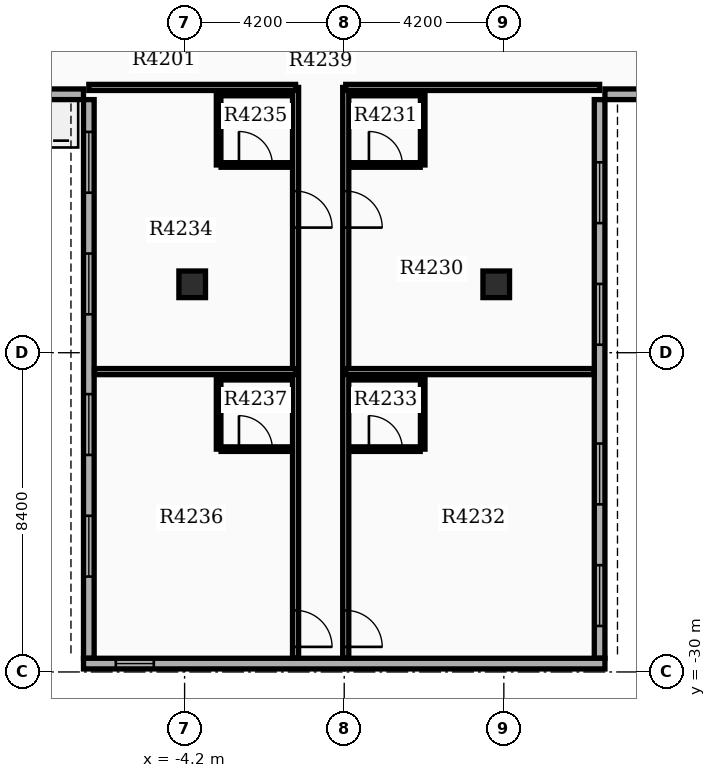
"""IFC4 building model, lengths in metres.
Left out: names, types, materials, properties, quantities, classifications, styles, units other than length and angle.
Written with IfcOpenShell. Run it as: python <this file> out.ifc"""

import sys

from ifc_helpers import new_model, si_unit, direction, frame, frame_2d, origin, origin_2d, place, context, subcontext, project, spatial, rectangle, extrude, element, fill, save


model = new_model("IFC4")
c1 = context("Model", 3, precision=1e-05, world=origin(), true_north=direction((0.0, 1.0)))
c2 = subcontext(c1, "Body", "Model", "MODEL_VIEW")
j1 = project(units=[si_unit("LENGTHUNIT", "METRE"), si_unit("PLANEANGLEUNIT", "RADIAN")], contexts=[c1])
p1 = place(None, origin())
s1 = spatial("IfcSite", under=j1, at=p1, CompositionType="ELEMENT")
p2 = place(p1, origin())
s2 = spatial("IfcBuilding", under=s1, at=p2, CompositionType="ELEMENT")
p3 = place(p2, frame((0.0, 0.0, 265.5)))
s3 = spatial("IfcBuildingStorey", under=s2, at=p3, CompositionType="ELEMENT", Elevation=265.5)
for number, where, z_axis, x_axis in (
    (1, (-4.0, -19.8, 0.0), (0.0, 0.0, 1.0), (1.0, 0.0, 0.0)),
    (2, (4.0, -19.8, 0.0), (0.0, 0.0, 1.0), (1.0, 0.0, 0.0)),
):
    element("IfcColumn", number, at=place(p3, frame(where, z_axis=z_axis, x_axis=x_axis)), inside=s3, PredefinedType="COLUMN", context=c2, shape_type="SweptSolid", body=[
        extrude(rectangle(XDim=0.7, YDim=0.7, at=origin_2d()), origin(), (0.0, 0.0, 1.0), 3.9),
    ])
p4 = place(p3, frame((-6.72, -14.94, 0.0), z_axis=(0.0, 0.0, 1.0), x_axis=(0.0, -1.0, 0.0)))
e3 = element("IfcWall", 3, at=p4, inside=s3, PredefinedType="STANDARD", context=c2, shape_type="SweptSolid", body=[
    extrude(rectangle(XDim=14.7, YDim=0.28, at=frame_2d((7.35, 0.0))), origin(), (0.0, 0.0, 1.0), 3.18),
])
p5 = place(p4, frame((0.85, 0.0, 0.8)))
e4 = element("IfcOpeningElement", 4, at=p5, cuts=e3, PredefinedType="OPENING", context=c2, shape_type="SweptSolid", body=[
    extrude(rectangle(XDim=1.6, YDim=1.7, at=frame_2d((0.8, 0.85))), frame((0.0, 0.15, 0.0), z_axis=(0.0, -1.0, 0.0), x_axis=(1.0, 0.0, 0.0)), (0.0, 0.0, 1.0), 0.3),
])
p6 = place(p4, frame((4.05, 0.0, 0.8)))
e5 = element("IfcOpeningElement", 5, at=p6, cuts=e3, PredefinedType="OPENING", context=c2, shape_type="SweptSolid", body=[
    extrude(rectangle(XDim=1.6, YDim=1.7, at=frame_2d((0.8, 0.85))), frame((0.0, 0.15, 0.0), z_axis=(0.0, -1.0, 0.0), x_axis=(1.0, 0.0, 0.0)), (0.0, 0.0, 1.0), 0.3),
])
p7 = place(p4, frame((7.75, 0.0, 0.8)))
e6 = element("IfcOpeningElement", 6, at=p7, cuts=e3, PredefinedType="OPENING", context=c2, shape_type="SweptSolid", body=[
    extrude(rectangle(XDim=1.6, YDim=1.7, at=frame_2d((0.8, 0.85))), frame((0.0, 0.15, 0.0), z_axis=(0.0, -1.0, 0.0), x_axis=(1.0, 0.0, 0.0)), (0.0, 0.0, 1.0), 0.3),
])
p8 = place(p4, frame((10.95, 0.0, 0.8)))
e7 = element("IfcOpeningElement", 7, at=p8, cuts=e3, PredefinedType="OPENING", context=c2, shape_type="SweptSolid", body=[
    extrude(rectangle(XDim=1.6, YDim=1.7, at=frame_2d((0.8, 0.85))), frame((0.0, 0.15, 0.0), z_axis=(0.0, -1.0, 0.0), x_axis=(1.0, 0.0, 0.0)), (0.0, 0.0, 1.0), 0.3),
])
p9 = place(p3, frame((6.72, -29.64, 0.0), z_axis=(0.0, 0.0, 1.0), x_axis=(0.0, 1.0, 0.0)))
e8 = element("IfcWall", 8, at=p9, inside=s3, PredefinedType="STANDARD", context=c2, shape_type="SweptSolid", body=[
    extrude(rectangle(XDim=14.7, YDim=0.28, at=frame_2d((7.35, 0.0))), origin(), (0.0, 0.0, 1.0), 3.18),
])
p10 = place(p9, frame((0.85, 0.0, 0.8)))
e9 = element("IfcOpeningElement", 9, at=p10, cuts=e8, PredefinedType="OPENING", context=c2, shape_type="SweptSolid", body=[
    extrude(rectangle(XDim=1.6, YDim=1.7, at=frame_2d((0.8, 0.85))), frame((0.0, 0.15, 0.0), z_axis=(0.0, -1.0, 0.0), x_axis=(1.0, 0.0, 0.0)), (0.0, 0.0, 1.0), 0.3),
])
p11 = place(p9, frame((4.05, 0.0, 0.8)))
e10 = element("IfcOpeningElement", 10, at=p11, cuts=e8, PredefinedType="OPENING", context=c2, shape_type="SweptSolid", body=[
    extrude(rectangle(XDim=1.6, YDim=1.7, at=frame_2d((0.8, 0.85))), frame((0.0, 0.15, 0.0), z_axis=(0.0, -1.0, 0.0), x_axis=(1.0, 0.0, 0.0)), (0.0, 0.0, 1.0), 0.3),
])
p12 = place(p9, frame((8.25, 0.0, 0.8)))
e11 = element("IfcOpeningElement", 11, at=p12, cuts=e8, PredefinedType="OPENING", context=c2, shape_type="SweptSolid", body=[
    extrude(rectangle(XDim=1.6, YDim=1.7, at=frame_2d((0.8, 0.85))), frame((0.0, 0.15, 0.0), z_axis=(0.0, -1.0, 0.0), x_axis=(1.0, 0.0, 0.0)), (0.0, 0.0, 1.0), 0.3),
])
p13 = place(p9, frame((11.45, 0.0, 0.8)))
e12 = element("IfcOpeningElement", 12, at=p13, cuts=e8, PredefinedType="OPENING", context=c2, shape_type="SweptSolid", body=[
    extrude(rectangle(XDim=1.6, YDim=1.7, at=frame_2d((0.8, 0.85))), frame((0.0, 0.15, 0.0), z_axis=(0.0, -1.0, 0.0), x_axis=(1.0, 0.0, 0.0)), (0.0, 0.0, 1.0), 0.3),
])
p14 = place(p3, frame((-6.86, -29.78, 0.0), z_axis=(0.0, 0.0, 1.0), x_axis=(1.0, 0.0, 0.0)))
e13 = element("IfcWall", 13, at=p14, inside=s3, PredefinedType="STANDARD", context=c2, shape_type="SweptSolid", body=[
    extrude(rectangle(XDim=13.72, YDim=0.28, at=frame_2d((6.86, 0.0))), origin(), (0.0, 0.0, 1.0), 3.18),
])
p15 = place(p14, frame((0.85, 0.0, 0.85)))
e14 = element("IfcOpeningElement", 14, at=p15, cuts=e13, PredefinedType="OPENING", context=c2, shape_type="SweptSolid", body=[
    extrude(rectangle(XDim=1.0, YDim=1.5, at=frame_2d((0.5, 0.75))), frame((0.0, 0.15, 0.0), z_axis=(0.0, -1.0, 0.0), x_axis=(1.0, 0.0, 0.0)), (0.0, 0.0, 1.0), 0.3),
])
for number, where, z_axis, x_axis in (
    (15, (-13.16, -14.8, 0.0), (0.0, 0.0, 1.0), (1.0, 0.0, 0.0)),
    (16, (13.16, -14.8, 0.0), (0.0, 0.0, 1.0), (-1.0, 0.0, 0.0)),
):
    element("IfcWall", number, at=place(p3, frame(where, z_axis=z_axis, x_axis=x_axis)), inside=s3, PredefinedType="STANDARD", context=c2, shape_type="SweptSolid", body=[
        extrude(rectangle(XDim=6.3, YDim=0.28, at=frame_2d((3.15, 0.0))), origin(), (0.0, 0.0, 1.0), 3.18),
    ])
p16 = place(p3, frame((0.04, -14.62, 0.0), z_axis=(0.0, 0.0, 1.0), x_axis=(0.0, -1.0, 0.0)))
e17 = element("IfcWall", 17, at=p16, inside=s3, PredefinedType="PARTITIONING", context=c2, shape_type="SweptSolid", body=[
    extrude(rectangle(XDim=15.012, YDim=0.16, at=frame_2d((7.506, 0.0))), origin(), (0.0, 0.0, 1.0), 3.17),
])
p17 = place(p16, frame((2.728, 0.0, 0.0)))
e18 = element("IfcOpeningElement", 18, at=p17, cuts=e17, PredefinedType="OPENING", context=c2, shape_type="SweptSolid", body=[
    extrude(rectangle(XDim=0.96, YDim=2.15, at=frame_2d((0.48, 1.075))), frame((0.0, 0.09, 0.0), z_axis=(0.0, -1.0, 0.0), x_axis=(1.0, 0.0, 0.0)), (0.0, 0.0, 1.0), 0.18),
])
p18 = place(p16, frame((13.76, 0.0, 0.0)))
e19 = element("IfcOpeningElement", 19, at=p18, cuts=e17, PredefinedType="OPENING", context=c2, shape_type="SweptSolid", body=[
    extrude(rectangle(XDim=0.96, YDim=2.15, at=frame_2d((0.48, 1.075))), frame((0.0, 0.09, 0.0), z_axis=(0.0, -1.0, 0.0), x_axis=(1.0, 0.0, 0.0)), (0.0, 0.0, 1.0), 0.18),
])
p19 = place(p3, frame((0.04, -14.62, 0.0), z_axis=(0.0, 0.0, 1.0), x_axis=(1.0, 0.0, 0.0)))
e20 = element("IfcWall", 20, at=p19, inside=s3, PredefinedType="PARTITIONING", context=c2, shape_type="SweptSolid", body=[
    extrude(rectangle(XDim=6.68, YDim=0.16, at=frame_2d((3.34, 0.0))), origin(), (0.0, 0.0, 1.0), 3.17),
])
p20 = place(p3, frame((0.04, -22.097, 0.0), z_axis=(0.0, 0.0, 1.0), x_axis=(1.0, 0.0, 0.0)))
e21 = element("IfcWall", 21, at=p20, inside=s3, PredefinedType="PARTITIONING", context=c2, shape_type="SweptSolid", body=[
    extrude(rectangle(XDim=6.532, YDim=0.16, at=frame_2d((3.266, 0.0))), origin(), (0.0, 0.0, 1.0), 3.17),
])
p21 = place(p3, frame((0.18, -16.66, 0.0), z_axis=(0.0, 0.0, 1.0), x_axis=(1.0, 0.0, 0.0)))
e22 = element("IfcWall", 22, at=p21, inside=s3, PredefinedType="PARTITIONING", context=c2, shape_type="SweptSolid", body=[
    extrude(rectangle(XDim=1.82, YDim=0.12, at=frame_2d((0.91, 0.0))), origin(), (0.0, 0.0, 1.0), 3.17),
])
p22 = place(p21, frame((0.47, 0.0, 0.0)))
e23 = element("IfcOpeningElement", 23, at=p22, cuts=e22, PredefinedType="OPENING", context=c2, shape_type="SweptSolid", body=[
    extrude(rectangle(XDim=0.88, YDim=2.1, at=frame_2d((0.44, 1.05))), frame((0.0, 0.07, 0.0), z_axis=(0.0, -1.0, 0.0), x_axis=(1.0, 0.0, 0.0)), (0.0, 0.0, 1.0), 0.14),
])
p23 = place(p3, frame((0.18, -14.78, 0.0), z_axis=(0.0, 0.0, 1.0), x_axis=(1.0, 0.0, 0.0)))
e24 = element("IfcWall", 24, at=p23, inside=s3, PredefinedType="PARTITIONING", context=c2, shape_type="SweptSolid", body=[
    extrude(rectangle(XDim=1.82, YDim=0.12, at=frame_2d((0.91, 0.0))), origin(), (0.0, 0.0, 1.0), 3.17),
])
p24 = place(p3, frame((2.065, -14.78, 0.0), z_axis=(0.0, 0.0, 1.0), x_axis=(0.0, -1.0, 0.0)))
e25 = element("IfcWall", 25, at=p24, inside=s3, PredefinedType="PARTITIONING", context=c2, shape_type="SweptSolid", body=[
    extrude(rectangle(XDim=1.88, YDim=0.12, at=frame_2d((0.94, 0.0))), origin(), (0.0, 0.0, 1.0), 3.17),
])
p25 = place(p3, frame((0.18, -24.137, 0.0), z_axis=(0.0, 0.0, 1.0), x_axis=(1.0, 0.0, 0.0)))
e26 = element("IfcWall", 26, at=p25, inside=s3, PredefinedType="PARTITIONING", context=c2, shape_type="SweptSolid", body=[
    extrude(rectangle(XDim=1.82, YDim=0.12, at=frame_2d((0.91, 0.0))), origin(), (0.0, 0.0, 1.0), 3.17),
])
p26 = place(p25, frame((0.47, 0.0, 0.0)))
e27 = element("IfcOpeningElement", 27, at=p26, cuts=e26, PredefinedType="OPENING", context=c2, shape_type="SweptSolid", body=[
    extrude(rectangle(XDim=0.88, YDim=2.1, at=frame_2d((0.44, 1.05))), frame((0.0, 0.07, 0.0), z_axis=(0.0, -1.0, 0.0), x_axis=(1.0, 0.0, 0.0)), (0.0, 0.0, 1.0), 0.14),
])
p27 = place(p3, frame((0.18, -22.257, 0.0), z_axis=(0.0, 0.0, 1.0), x_axis=(1.0, 0.0, 0.0)))
e28 = element("IfcWall", 28, at=p27, inside=s3, PredefinedType="PARTITIONING", context=c2, shape_type="SweptSolid", body=[
    extrude(rectangle(XDim=1.82, YDim=0.12, at=frame_2d((0.91, 0.0))), origin(), (0.0, 0.0, 1.0), 3.17),
])
p28 = place(p3, frame((2.065, -22.257, 0.0), z_axis=(0.0, 0.0, 1.0), x_axis=(0.0, -1.0, 0.0)))
e29 = element("IfcWall", 29, at=p28, inside=s3, PredefinedType="PARTITIONING", context=c2, shape_type="SweptSolid", body=[
    extrude(rectangle(XDim=1.88, YDim=0.12, at=frame_2d((0.94, 0.0))), origin(), (0.0, 0.0, 1.0), 3.17),
])
p29 = place(p3, frame((-1.28, -14.62, 0.0), z_axis=(0.0, 0.0, 1.0), x_axis=(0.0, -1.0, 0.0)))
e30 = element("IfcWall", 30, at=p29, inside=s3, PredefinedType="PARTITIONING", context=c2, shape_type="SweptSolid", body=[
    extrude(rectangle(XDim=15.012, YDim=0.16, at=frame_2d((7.506, 0.0))), origin(), (0.0, 0.0, 1.0), 3.17),
])
p30 = place(p29, frame((2.728, 0.0, 0.0)))
e31 = element("IfcOpeningElement", 31, at=p30, cuts=e30, PredefinedType="OPENING", context=c2, shape_type="SweptSolid", body=[
    extrude(rectangle(XDim=0.96, YDim=2.15, at=frame_2d((0.48, 1.075))), frame((0.0, 0.09, 0.0), z_axis=(0.0, -1.0, 0.0), x_axis=(1.0, 0.0, 0.0)), (0.0, 0.0, 1.0), 0.18),
])
p31 = place(p29, frame((13.76, 0.0, 0.0)))
e32 = element("IfcOpeningElement", 32, at=p31, cuts=e30, PredefinedType="OPENING", context=c2, shape_type="SweptSolid", body=[
    extrude(rectangle(XDim=0.96, YDim=2.15, at=frame_2d((0.48, 1.075))), frame((0.0, 0.09, 0.0), z_axis=(0.0, -1.0, 0.0), x_axis=(1.0, 0.0, 0.0)), (0.0, 0.0, 1.0), 0.18),
])
p32 = place(p3, frame((-1.28, -14.62, 0.0), z_axis=(0.0, 0.0, 1.0), x_axis=(-1.0, 0.0, 0.0)))
e33 = element("IfcWall", 33, at=p32, inside=s3, PredefinedType="PARTITIONING", context=c2, shape_type="SweptSolid", body=[
    extrude(rectangle(XDim=5.44, YDim=0.16, at=frame_2d((2.72, 0.0))), origin(), (0.0, 0.0, 1.0), 3.17),
])
p33 = place(p3, frame((-1.28, -22.097, 0.0), z_axis=(0.0, 0.0, 1.0), x_axis=(-1.0, 0.0, 0.0)))
e34 = element("IfcWall", 34, at=p33, inside=s3, PredefinedType="PARTITIONING", context=c2, shape_type="SweptSolid", body=[
    extrude(rectangle(XDim=5.292, YDim=0.16, at=frame_2d((2.646, 0.0))), origin(), (0.0, 0.0, 1.0), 3.17),
])
p34 = place(p3, frame((-3.24, -16.66, 0.0), z_axis=(0.0, 0.0, 1.0), x_axis=(1.0, 0.0, 0.0)))
e35 = element("IfcWall", 35, at=p34, inside=s3, PredefinedType="PARTITIONING", context=c2, shape_type="SweptSolid", body=[
    extrude(rectangle(XDim=1.82, YDim=0.12, at=frame_2d((0.91, 0.0))), origin(), (0.0, 0.0, 1.0), 3.17),
])
p35 = place(p34, frame((0.47, 0.0, 0.0)))
e36 = element("IfcOpeningElement", 36, at=p35, cuts=e35, PredefinedType="OPENING", context=c2, shape_type="SweptSolid", body=[
    extrude(rectangle(XDim=0.88, YDim=2.1, at=frame_2d((0.44, 1.05))), frame((0.0, 0.07, 0.0), z_axis=(0.0, -1.0, 0.0), x_axis=(1.0, 0.0, 0.0)), (0.0, 0.0, 1.0), 0.14),
])
p36 = place(p3, frame((-3.24, -14.78, 0.0), z_axis=(0.0, 0.0, 1.0), x_axis=(1.0, 0.0, 0.0)))
e37 = element("IfcWall", 37, at=p36, inside=s3, PredefinedType="PARTITIONING", context=c2, shape_type="SweptSolid", body=[
    extrude(rectangle(XDim=1.82, YDim=0.12, at=frame_2d((0.91, 0.0))), origin(), (0.0, 0.0, 1.0), 3.17),
])
p37 = place(p3, frame((-3.305, -14.78, 0.0), z_axis=(0.0, 0.0, 1.0), x_axis=(0.0, -1.0, 0.0)))
e38 = element("IfcWall", 38, at=p37, inside=s3, PredefinedType="PARTITIONING", context=c2, shape_type="SweptSolid", body=[
    extrude(rectangle(XDim=1.88, YDim=0.12, at=frame_2d((0.94, 0.0))), origin(), (0.0, 0.0, 1.0), 3.17),
])
p38 = place(p3, frame((-3.24, -24.137, 0.0), z_axis=(0.0, 0.0, 1.0), x_axis=(1.0, 0.0, 0.0)))
e39 = element("IfcWall", 39, at=p38, inside=s3, PredefinedType="PARTITIONING", context=c2, shape_type="SweptSolid", body=[
    extrude(rectangle(XDim=1.82, YDim=0.12, at=frame_2d((0.91, 0.0))), origin(), (0.0, 0.0, 1.0), 3.17),
])
p39 = place(p38, frame((0.47, 0.0, 0.0)))
e40 = element("IfcOpeningElement", 40, at=p39, cuts=e39, PredefinedType="OPENING", context=c2, shape_type="SweptSolid", body=[
    extrude(rectangle(XDim=0.88, YDim=2.1, at=frame_2d((0.44, 1.05))), frame((0.0, 0.07, 0.0), z_axis=(0.0, -1.0, 0.0), x_axis=(1.0, 0.0, 0.0)), (0.0, 0.0, 1.0), 0.14),
])
p40 = place(p3, frame((-3.24, -22.257, 0.0), z_axis=(0.0, 0.0, 1.0), x_axis=(1.0, 0.0, 0.0)))
e41 = element("IfcWall", 41, at=p40, inside=s3, PredefinedType="PARTITIONING", context=c2, shape_type="SweptSolid", body=[
    extrude(rectangle(XDim=1.82, YDim=0.12, at=frame_2d((0.91, 0.0))), origin(), (0.0, 0.0, 1.0), 3.17),
])
p41 = place(p3, frame((-3.305, -22.257, 0.0), z_axis=(0.0, 0.0, 1.0), x_axis=(0.0, -1.0, 0.0)))
e42 = element("IfcWall", 42, at=p41, inside=s3, PredefinedType="PARTITIONING", context=c2, shape_type="SweptSolid", body=[
    extrude(rectangle(XDim=1.88, YDim=0.12, at=frame_2d((0.94, 0.0))), origin(), (0.0, 0.0, 1.0), 3.17),
])
p42 = place(p5, origin())
e43 = element("IfcWindow", 43, at=p42, inside=s3, PartitioningType="SINGLE_PANEL", PredefinedType="WINDOW", context=c2, shape_type="SweptSolid", body=[
    extrude(rectangle(XDim=1.6, YDim=1.7, at=frame_2d((0.8, 0.85))), frame((0.0, 0.03, 0.0), z_axis=(0.0, -1.0, 0.0), x_axis=(1.0, 0.0, 0.0)), (0.0, 0.0, 1.0), 0.06),
])
fill(e4, e43)
p43 = place(p6, origin())
e44 = element("IfcWindow", 44, at=p43, inside=s3, PartitioningType="SINGLE_PANEL", PredefinedType="WINDOW", context=c2, shape_type="SweptSolid", body=[
    extrude(rectangle(XDim=1.6, YDim=1.7, at=frame_2d((0.8, 0.85))), frame((0.0, 0.03, 0.0), z_axis=(0.0, -1.0, 0.0), x_axis=(1.0, 0.0, 0.0)), (0.0, 0.0, 1.0), 0.06),
])
fill(e5, e44)
p44 = place(p7, origin())
e45 = element("IfcWindow", 45, at=p44, inside=s3, PartitioningType="SINGLE_PANEL", PredefinedType="WINDOW", context=c2, shape_type="SweptSolid", body=[
    extrude(rectangle(XDim=1.6, YDim=1.7, at=frame_2d((0.8, 0.85))), frame((0.0, 0.03, 0.0), z_axis=(0.0, -1.0, 0.0), x_axis=(1.0, 0.0, 0.0)), (0.0, 0.0, 1.0), 0.06),
])
fill(e6, e45)
p45 = place(p8, origin())
e46 = element("IfcWindow", 46, at=p45, inside=s3, PartitioningType="SINGLE_PANEL", PredefinedType="WINDOW", context=c2, shape_type="SweptSolid", body=[
    extrude(rectangle(XDim=1.6, YDim=1.7, at=frame_2d((0.8, 0.85))), frame((0.0, 0.03, 0.0), z_axis=(0.0, -1.0, 0.0), x_axis=(1.0, 0.0, 0.0)), (0.0, 0.0, 1.0), 0.06),
])
fill(e7, e46)
p46 = place(p10, origin())
e47 = element("IfcWindow", 47, at=p46, inside=s3, PartitioningType="SINGLE_PANEL", PredefinedType="WINDOW", context=c2, shape_type="SweptSolid", body=[
    extrude(rectangle(XDim=1.6, YDim=1.7, at=frame_2d((0.8, 0.85))), frame((0.0, 0.03, 0.0), z_axis=(0.0, -1.0, 0.0), x_axis=(1.0, 0.0, 0.0)), (0.0, 0.0, 1.0), 0.06),
])
fill(e9, e47)
p47 = place(p11, origin())
e48 = element("IfcWindow", 48, at=p47, inside=s3, PartitioningType="SINGLE_PANEL", PredefinedType="WINDOW", context=c2, shape_type="SweptSolid", body=[
    extrude(rectangle(XDim=1.6, YDim=1.7, at=frame_2d((0.8, 0.85))), frame((0.0, 0.03, 0.0), z_axis=(0.0, -1.0, 0.0), x_axis=(1.0, 0.0, 0.0)), (0.0, 0.0, 1.0), 0.06),
])
fill(e10, e48)
p48 = place(p12, origin())
e49 = element("IfcWindow", 49, at=p48, inside=s3, PartitioningType="SINGLE_PANEL", PredefinedType="WINDOW", context=c2, shape_type="SweptSolid", body=[
    extrude(rectangle(XDim=1.6, YDim=1.7, at=frame_2d((0.8, 0.85))), frame((0.0, 0.03, 0.0), z_axis=(0.0, -1.0, 0.0), x_axis=(1.0, 0.0, 0.0)), (0.0, 0.0, 1.0), 0.06),
])
fill(e11, e49)
p49 = place(p13, origin())
e50 = element("IfcWindow", 50, at=p49, inside=s3, PartitioningType="SINGLE_PANEL", PredefinedType="WINDOW", context=c2, shape_type="SweptSolid", body=[
    extrude(rectangle(XDim=1.6, YDim=1.7, at=frame_2d((0.8, 0.85))), frame((0.0, 0.03, 0.0), z_axis=(0.0, -1.0, 0.0), x_axis=(1.0, 0.0, 0.0)), (0.0, 0.0, 1.0), 0.06),
])
fill(e12, e50)
p50 = place(p15, origin())
e51 = element("IfcWindow", 51, at=p50, inside=s3, PartitioningType="SINGLE_PANEL", PredefinedType="WINDOW", context=c2, shape_type="SweptSolid", body=[
    extrude(rectangle(XDim=1.0, YDim=1.5, at=frame_2d((0.5, 0.75))), frame((0.0, 0.03, 0.0), z_axis=(0.0, -1.0, 0.0), x_axis=(1.0, 0.0, 0.0)), (0.0, 0.0, 1.0), 0.06),
])
fill(e14, e51)
p51 = place(p17, origin())
e52 = element("IfcDoor", 52, at=p51, inside=s3, OperationType="SINGLE_SWING_RIGHT", PredefinedType="DOOR", context=c2, shape_type="SweptSolid", body=[
    extrude(rectangle(XDim=0.96, YDim=2.15, at=frame_2d((0.48, 1.075))), frame((0.0, 0.025, 0.0), z_axis=(0.0, -1.0, 0.0), x_axis=(1.0, 0.0, 0.0)), (0.0, 0.0, 1.0), 0.05),
])
fill(e18, e52)
p52 = place(p22, origin())
e53 = element("IfcDoor", 53, at=p52, inside=s3, OperationType="SINGLE_SWING_LEFT", PredefinedType="DOOR", context=c2, shape_type="SweptSolid", body=[
    extrude(rectangle(XDim=0.88, YDim=2.1, at=frame_2d((0.44, 1.05))), frame((0.0, 0.025, 0.0), z_axis=(0.0, -1.0, 0.0), x_axis=(1.0, 0.0, 0.0)), (0.0, 0.0, 1.0), 0.05),
])
fill(e23, e53)
p53 = place(p18, origin())
e54 = element("IfcDoor", 54, at=p53, inside=s3, OperationType="SINGLE_SWING_RIGHT", PredefinedType="DOOR", context=c2, shape_type="SweptSolid", body=[
    extrude(rectangle(XDim=0.96, YDim=2.15, at=frame_2d((0.48, 1.075))), frame((0.0, 0.025, 0.0), z_axis=(0.0, -1.0, 0.0), x_axis=(1.0, 0.0, 0.0)), (0.0, 0.0, 1.0), 0.05),
])
fill(e19, e54)
p54 = place(p26, origin())
e55 = element("IfcDoor", 55, at=p54, inside=s3, OperationType="SINGLE_SWING_LEFT", PredefinedType="DOOR", context=c2, shape_type="SweptSolid", body=[
    extrude(rectangle(XDim=0.88, YDim=2.1, at=frame_2d((0.44, 1.05))), frame((0.0, 0.025, 0.0), z_axis=(0.0, -1.0, 0.0), x_axis=(1.0, 0.0, 0.0)), (0.0, 0.0, 1.0), 0.05),
])
fill(e27, e55)
p55 = place(p30, origin())
e56 = element("IfcDoor", 56, at=p55, inside=s3, OperationType="SINGLE_SWING_RIGHT", PredefinedType="DOOR", context=c2, shape_type="SweptSolid", body=[
    extrude(rectangle(XDim=0.96, YDim=2.15, at=frame_2d((0.48, 1.075))), frame((0.0, 0.025, 0.0), z_axis=(0.0, -1.0, 0.0), x_axis=(1.0, 0.0, 0.0)), (0.0, 0.0, 1.0), 0.05),
])
fill(e31, e56)
p56 = place(p35, origin())
e57 = element("IfcDoor", 57, at=p56, inside=s3, OperationType="SINGLE_SWING_LEFT", PredefinedType="DOOR", context=c2, shape_type="SweptSolid", body=[
    extrude(rectangle(XDim=0.88, YDim=2.1, at=frame_2d((0.44, 1.05))), frame((0.0, 0.025, 0.0), z_axis=(0.0, -1.0, 0.0), x_axis=(1.0, 0.0, 0.0)), (0.0, 0.0, 1.0), 0.05),
])
fill(e36, e57)
p57 = place(p31, origin())
e58 = element("IfcDoor", 58, at=p57, inside=s3, OperationType="SINGLE_SWING_RIGHT", PredefinedType="DOOR", context=c2, shape_type="SweptSolid", body=[
    extrude(rectangle(XDim=0.96, YDim=2.15, at=frame_2d((0.48, 1.075))), frame((0.0, 0.025, 0.0), z_axis=(0.0, -1.0, 0.0), x_axis=(1.0, 0.0, 0.0)), (0.0, 0.0, 1.0), 0.05),
])
fill(e32, e58)
p58 = place(p39, origin())
e59 = element("IfcDoor", 59, at=p58, inside=s3, OperationType="SINGLE_SWING_LEFT", PredefinedType="DOOR", context=c2, shape_type="SweptSolid", body=[
    extrude(rectangle(XDim=0.88, YDim=2.1, at=frame_2d((0.44, 1.05))), frame((0.0, 0.025, 0.0), z_axis=(0.0, -1.0, 0.0), x_axis=(1.0, 0.0, 0.0)), (0.0, 0.0, 1.0), 0.05),
])
fill(e40, e59)
save(model, sys.argv[1])
